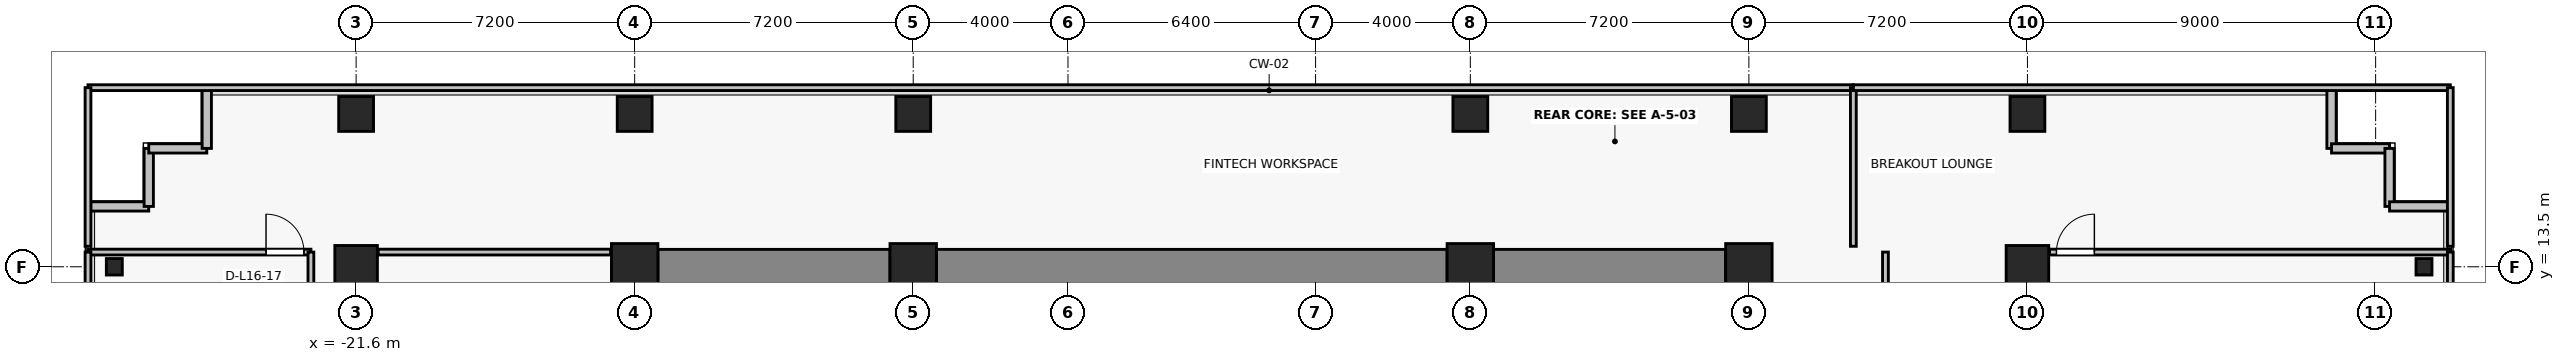
"""IFC4 building model, lengths in metres.
Left out: names, types, materials, properties, quantities, classifications, styles, units other than length and angle.
Written with IfcOpenShell. Run it as: python <this file> out.ifc"""

import sys

from ifc_helpers import new_model, si_unit, direction, frame, frame_2d, origin, origin_2d, place, context, subcontext, project, spatial, rectangle, i_section, extrude, source, transform, mapped, element, fill, save


model = new_model("IFC4")
c1 = context("Model", 3, precision=1e-05, world=origin(), true_north=direction((0.0, 1.0)))
c2 = subcontext(c1, "Body", "Model", "MODEL_VIEW")
j1 = project(units=[si_unit("LENGTHUNIT", "METRE"), si_unit("PLANEANGLEUNIT", "RADIAN")], contexts=[c1])
p1 = place(None, origin())
s1 = spatial("IfcSite", under=j1, at=p1, CompositionType="ELEMENT")
p2 = place(p1, origin())
s2 = spatial("IfcBuilding", under=s1, at=p2, CompositionType="ELEMENT")
p3 = place(p2, frame((0.0, 0.0, 60.4)))
s3 = spatial("IfcBuildingStorey", under=s2, at=p3, CompositionType="ELEMENT", Elevation=60.4)
for number, where, z_axis, x_axis in (
    (1, (-14.4, 13.5, 0.0), (0.0, 0.0, 1.0), (1.0, 0.0, 0.0)),
    (2, (-7.2, 13.5, 0.0), (0.0, 0.0, 1.0), (1.0, 0.0, 0.0)),
    (3, (7.2, 13.5, 0.0), (0.0, 0.0, 1.0), (1.0, 0.0, 0.0)),
    (4, (14.4, 13.5, 0.0), (0.0, 0.0, 1.0), (1.0, 0.0, 0.0)),
):
    element("IfcColumn", number, at=place(p3, frame(where, z_axis=z_axis, x_axis=x_axis)), inside=s3, PredefinedType="COLUMN", context=c2, shape_type="SweptSolid", body=[
        extrude(rectangle(XDim=1.2, YDim=1.2, at=origin_2d()), origin(), (0.0, 0.0, 1.0), 3.3),
    ])
for number, where, z_axis, x_axis in (
    (5, (-21.6, 13.5, 0.0), (0.0, 0.0, 1.0), (1.0, 0.0, 0.0)),
    (6, (21.6, 13.5, 0.0), (0.0, 0.0, 1.0), (1.0, 0.0, 0.0)),
):
    element("IfcColumn", number, at=place(p3, frame(where, z_axis=z_axis, x_axis=x_axis)), inside=s3, PredefinedType="COLUMN", context=c2, shape_type="SweptSolid", body=[
        extrude(rectangle(XDim=1.1, YDim=1.1, at=origin_2d()), origin(), (0.0, 0.0, 1.0), 3.3),
    ])
for number, where, z_axis, x_axis in (
    (7, (-14.4, 17.45, 0.0), (0.0, 0.0, 1.0), (1.0, 0.0, 0.0)),
    (8, (-7.2, 17.45, 0.0), (0.0, 0.0, 1.0), (1.0, 0.0, 0.0)),
    (9, (7.2, 17.45, 0.0), (0.0, 0.0, 1.0), (1.0, 0.0, 0.0)),
    (10, (14.4, 17.45, 0.0), (0.0, 0.0, 1.0), (1.0, 0.0, 0.0)),
    (11, (-21.6, 17.45, 0.0), (0.0, 0.0, 1.0), (1.0, 0.0, 0.0)),
    (12, (21.6, 17.45, 0.0), (0.0, 0.0, 1.0), (1.0, 0.0, 0.0)),
):
    element("IfcColumn", number, at=place(p3, frame(where, z_axis=z_axis, x_axis=x_axis)), inside=s3, PredefinedType="COLUMN", context=c2, shape_type="SweptSolid", body=[
        extrude(rectangle(XDim=0.9, YDim=0.9, at=origin_2d()), origin(), (0.0, 0.0, 1.0), 3.3),
    ])
for number, where, z_axis, x_axis in (
    (13, (-27.85, 13.5, 0.0), (0.0, 0.0, 1.0), (1.0, 0.0, 0.0)),
    (14, (31.85, 13.5, 0.0), (0.0, 0.0, 1.0), (1.0, 0.0, 0.0)),
):
    element("IfcColumn", number, at=place(p3, frame(where, z_axis=z_axis, x_axis=x_axis)), inside=s3, PredefinedType="COLUMN", context=c2, shape_type="SweptSolid", body=[
        extrude(i_section(OverallWidth=0.412, OverallDepth=0.425, WebThickness=0.026, FlangeThickness=0.039, FilletRadius=0.015, at=origin_2d()), origin(), (0.0, 0.0, 1.0), 3.3),
    ])
p4 = place(p3, frame((-13.8, 13.5, 0.0), z_axis=(0.0, 0.0, 1.0), x_axis=(1.0, 0.0, 0.0)))
e15 = element("IfcWall", 15, at=p4, inside=s3, PredefinedType="SHEAR", context=c2, shape_type="SweptSolid", body=[
    extrude(rectangle(XDim=6.0, YDim=0.9, at=frame_2d((3.0, 0.0))), origin(), (0.0, 0.0, 1.0), 3.075),
])
p5 = place(p3, frame((-6.6, 13.5, 0.0), z_axis=(0.0, 0.0, 1.0), x_axis=(1.0, 0.0, 0.0)))
e16 = element("IfcWall", 16, at=p5, inside=s3, PredefinedType="SHEAR", context=c2, shape_type="SweptSolid", body=[
    extrude(rectangle(XDim=13.2, YDim=0.9, at=frame_2d((6.6, 0.0))), origin(), (0.0, 0.0, 1.0), 3.075),
])
p6 = place(p3, frame((7.8, 13.5, 0.0), z_axis=(0.0, 0.0, 1.0), x_axis=(1.0, 0.0, 0.0)))
e17 = element("IfcWall", 17, at=p6, inside=s3, PredefinedType="SHEAR", context=c2, shape_type="SweptSolid", body=[
    extrude(rectangle(XDim=6.0, YDim=0.9, at=frame_2d((3.0, 0.0))), origin(), (0.0, 0.0, 1.0), 3.075),
])
for number, where, z_axis, x_axis in (
    (18, (-26.96, 15.06, 0.0), (0.0, 0.0, 1.0), (-1.0, 0.0, 0.0)),
    (19, (-26.96, 16.56, 0.0), (0.0, 0.0, 1.0), (0.0, -1.0, 0.0)),
    (20, (-25.46, 16.56, 0.0), (0.0, 0.0, 1.0), (-1.0, 0.0, 0.0)),
    (21, (-25.46, 18.06, 0.0), (0.0, 0.0, 1.0), (0.0, -1.0, 0.0)),
    (22, (29.46, 16.56, 0.0), (0.0, 0.0, 1.0), (0.0, 1.0, 0.0)),
    (23, (30.96, 16.56, 0.0), (0.0, 0.0, 1.0), (-1.0, 0.0, 0.0)),
    (24, (30.96, 15.06, 0.0), (0.0, 0.0, 1.0), (0.0, 1.0, 0.0)),
    (25, (32.46, 15.06, 0.0), (0.0, 0.0, 1.0), (-1.0, 0.0, 0.0)),
):
    element("IfcWall", number, at=place(p3, frame(where, z_axis=z_axis, x_axis=x_axis)), inside=s3, PredefinedType="SOLIDWALL", context=c2, shape_type="SweptSolid", body=[
        extrude(rectangle(XDim=1.5, YDim=0.24, at=frame_2d((0.75, 0.0))), origin(), (0.0, 0.0, 1.0), 3.075),
    ])
p7 = place(p3, frame((-28.53, 13.88, 0.0), z_axis=(0.0, 0.0, 1.0), x_axis=(1.0, 0.0, 0.0)))
e26 = element("IfcWall", 26, at=p7, inside=s3, PredefinedType="PARTITIONING", context=c2, shape_type="SweptSolid", body=[
    extrude(rectangle(XDim=5.761, YDim=0.15, at=frame_2d((2.881, 0.0))), origin(), (0.0, 0.0, 1.0), 3.075),
])
p8 = place(p7, frame((4.602, 0.0, 0.0)))
e27 = element("IfcOpeningElement", 27, at=p8, cuts=e26, PredefinedType="OPENING", context=c2, shape_type="SweptSolid", body=[
    extrude(rectangle(XDim=0.98, YDim=2.15, at=frame_2d((0.49, 1.075))), frame((0.0, 0.085, 0.0), z_axis=(0.0, -1.0, 0.0), x_axis=(1.0, 0.0, 0.0)), (0.0, 0.0, 1.0), 0.17),
])
p9 = place(p3, frame((-28.53, -1.77, 0.0), z_axis=(0.0, 0.0, 1.0), x_axis=(0.0, 1.0, 0.0)))
e28 = element("IfcWall", 28, at=p9, inside=s3, PredefinedType="PARTITIONING", context=c2, shape_type="SweptSolid", body=[
    extrude(rectangle(XDim=15.65, YDim=0.15, at=frame_2d((7.825, 0.0))), origin(), (0.0, 0.0, 1.0), 3.075),
])
p10 = place(p3, frame((-22.769, 13.88, 0.0), z_axis=(0.0, 0.0, 1.0), x_axis=(0.0, -1.0, 0.0)))
e29 = element("IfcWall", 29, at=p10, inside=s3, PredefinedType="PARTITIONING", context=c2, shape_type="SweptSolid", body=[
    extrude(rectangle(XDim=15.65, YDim=0.15, at=frame_2d((7.825, 0.0))), origin(), (0.0, 0.0, 1.0), 2.465),
])
p11 = place(p3, frame((-21.03, 13.88, 0.0), z_axis=(0.0, 0.0, 1.0), x_axis=(1.0, 0.0, 0.0)))
e30 = element("IfcWall", 30, at=p11, inside=s3, PredefinedType="PARTITIONING", context=c2, shape_type="SweptSolid", body=[
    extrude(rectangle(XDim=6.01, YDim=0.15, at=frame_2d((3.005, 0.0))), origin(), (0.0, 0.0, 1.0), 3.075),
])
p12 = place(p3, frame((22.17, 13.88, 0.0), z_axis=(0.0, 0.0, 1.0), x_axis=(1.0, 0.0, 0.0)))
e31 = element("IfcWall", 31, at=p12, inside=s3, PredefinedType="PARTITIONING", context=c2, shape_type="SweptSolid", body=[
    extrude(rectangle(XDim=10.36, YDim=0.15, at=frame_2d((5.18, 0.0))), origin(), (0.0, 0.0, 1.0), 3.075),
])
p13 = place(p12, frame((0.18, 0.0, 0.0)))
e32 = element("IfcOpeningElement", 32, at=p13, cuts=e31, PredefinedType="OPENING", context=c2, shape_type="SweptSolid", body=[
    extrude(rectangle(XDim=0.98, YDim=2.15, at=frame_2d((0.49, 1.075))), frame((0.0, 0.085, 0.0), z_axis=(0.0, -1.0, 0.0), x_axis=(1.0, 0.0, 0.0)), (0.0, 0.0, 1.0), 0.17),
])
p14 = place(p3, frame((17.93, -1.77, 0.0), z_axis=(0.0, 0.0, 1.0), x_axis=(0.0, 1.0, 0.0)))
e33 = element("IfcWall", 33, at=p14, inside=s3, PredefinedType="PARTITIONING", context=c2, shape_type="SweptSolid", body=[
    extrude(rectangle(XDim=15.65, YDim=0.15, at=frame_2d((7.825, 0.0))), origin(), (0.0, 0.0, 1.0), 2.465),
])
p15 = place(p14, frame((7.335, 0.0, 0.0)))
e34 = element("IfcOpeningElement", 34, at=p15, cuts=e33, PredefinedType="OPENING", context=c2, shape_type="SweptSolid", body=[
    extrude(rectangle(XDim=0.98, YDim=2.15, at=frame_2d((0.49, 1.075))), frame((0.0, 0.085, 0.0), z_axis=(0.0, -1.0, 0.0), x_axis=(1.0, 0.0, 0.0)), (0.0, 0.0, 1.0), 0.17),
])
p16 = place(p3, frame((32.53, 13.88, 0.0), z_axis=(0.0, 0.0, 1.0), x_axis=(0.0, -1.0, 0.0)))
e35 = element("IfcWall", 35, at=p16, inside=s3, PredefinedType="PARTITIONING", context=c2, shape_type="SweptSolid", body=[
    extrude(rectangle(XDim=15.65, YDim=0.15, at=frame_2d((7.825, 0.0))), origin(), (0.0, 0.0, 1.0), 3.075),
])
p17 = place(p3, frame((-28.53, 18.13, 0.0), z_axis=(0.0, 0.0, 1.0), x_axis=(1.0, 0.0, 0.0)))
e36 = element("IfcWall", 36, at=p17, inside=s3, PredefinedType="PARTITIONING", context=c2, shape_type="SweptSolid", body=[
    extrude(rectangle(XDim=45.63, YDim=0.15, at=frame_2d((22.815, 0.0))), origin(), (0.0, 0.0, 1.0), 3.075),
])
p18 = place(p3, frame((-28.53, 14.03, 0.0), z_axis=(0.0, 0.0, 1.0), x_axis=(0.0, 1.0, 0.0)))
e37 = element("IfcWall", 37, at=p18, inside=s3, PredefinedType="PARTITIONING", context=c2, shape_type="SweptSolid", body=[
    extrude(rectangle(XDim=4.1, YDim=0.15, at=frame_2d((2.05, 0.0))), origin(), (0.0, 0.0, 1.0), 3.075),
])
p19 = place(p3, frame((17.1, 18.13, 0.0), z_axis=(0.0, 0.0, 1.0), x_axis=(0.0, -1.0, 0.0)))
e38 = element("IfcWall", 38, at=p19, inside=s3, PredefinedType="PARTITIONING", context=c2, shape_type="SweptSolid", body=[
    extrude(rectangle(XDim=4.1, YDim=0.15, at=frame_2d((2.05, 0.0))), origin(), (0.0, 0.0, 1.0), 2.465),
])
p20 = place(p3, frame((17.1, 18.13, 0.0), z_axis=(0.0, 0.0, 1.0), x_axis=(1.0, 0.0, 0.0)))
e39 = element("IfcWall", 39, at=p20, inside=s3, PredefinedType="PARTITIONING", context=c2, shape_type="SweptSolid", body=[
    extrude(rectangle(XDim=15.43, YDim=0.15, at=frame_2d((7.715, 0.0))), origin(), (0.0, 0.0, 1.0), 3.075),
])
p21 = place(p3, frame((32.53, 18.13, 0.0), z_axis=(0.0, 0.0, 1.0), x_axis=(0.0, -1.0, 0.0)))
e40 = element("IfcWall", 40, at=p21, inside=s3, PredefinedType="PARTITIONING", context=c2, shape_type="SweptSolid", body=[
    extrude(rectangle(XDim=4.1, YDim=0.15, at=frame_2d((2.05, 0.0))), origin(), (0.0, 0.0, 1.0), 3.075),
])
m1 = source(origin(), c2, "Body", "SweptSolid", [
    extrude(rectangle(XDim=0.98, YDim=2.15, at=frame_2d((0.49, 1.075))), frame((0.0, 0.025, 0.0), z_axis=(0.0, -1.0, 0.0), x_axis=(1.0, 0.0, 0.0)), (0.0, 0.0, 1.0), 0.05),
])
p22 = place(p8, origin())
e41 = element("IfcDoor", 41, at=p22, inside=s3, OperationType="SINGLE_SWING_LEFT", PredefinedType="DOOR", context=c2, shape_type="MappedRepresentation", body=[
    mapped(m1, transform((0.0, 0.0, 0.0), x_axis=(1.0, 0.0, 0.0), y_axis=(0.0, 1.0, 0.0), z_axis=(0.0, 0.0, 1.0), scale=1.0)),
])
fill(e27, e41)
p23 = place(p13, origin())
e42 = element("IfcDoor", 42, at=p23, inside=s3, OperationType="SINGLE_SWING_RIGHT", PredefinedType="DOOR", context=c2, shape_type="MappedRepresentation", body=[
    mapped(m1, transform((0.0, 0.0, 0.0), x_axis=(1.0, 0.0, 0.0), y_axis=(0.0, 1.0, 0.0), z_axis=(0.0, 0.0, 1.0), scale=1.0)),
])
fill(e32, e42)
save(model, sys.argv[1])
